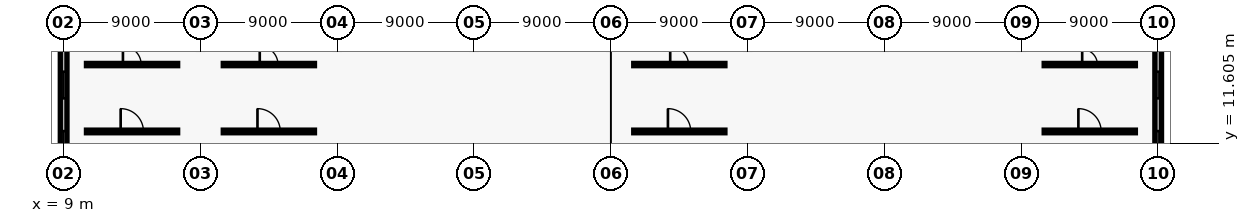
"""IFC4 building model, lengths in metres.
Left out: names, types, materials, properties, quantities, classifications, styles, units other than length and angle.
Written with IfcOpenShell. Run it as: python <this file> out.ifc"""

import sys

from ifc_helpers import new_model, si_unit, direction, frame, frame_2d, origin, place, context, subcontext, project, spatial, rectangle, extrude, element, fill, save


model = new_model("IFC4")
c1 = context("Model", 3, precision=1e-05, world=origin(), true_north=direction((0.0, 1.0)))
c2 = subcontext(c1, "Body", "Model", "MODEL_VIEW")
j1 = project(units=[si_unit("LENGTHUNIT", "METRE"), si_unit("PLANEANGLEUNIT", "RADIAN")], contexts=[c1])
p1 = place(None, origin())
s1 = spatial("IfcSite", under=j1, at=p1, CompositionType="ELEMENT")
p2 = place(p1, origin())
s2 = spatial("IfcBuilding", under=s1, at=p2, CompositionType="ELEMENT")
p3 = place(p2, frame((0.0, 0.0, 5.4)))
s3 = spatial("IfcBuildingStorey", under=s2, at=p3, CompositionType="ELEMENT", Elevation=5.4)
p4 = place(p3, frame((9.0, 9.06, 0.0), z_axis=(0.0, 0.0, 1.0), x_axis=(0.0, 1.0, 0.0)))
e1 = element("IfcWall", 1, at=p4, inside=s3, PredefinedType="SOLIDWALL", context=c2, shape_type="SweptSolid", body=[
    extrude(rectangle(XDim=8.88, YDim=0.44, at=frame_2d((4.44, 0.0))), origin(), (0.0, 0.0, 1.0), 3.5),
])
p5 = place(p4, frame((1.611, 0.0, 0.9)))
e2 = element("IfcOpeningElement", 2, at=p5, cuts=e1, PredefinedType="OPENING", context=c2, shape_type="SweptSolid", body=[
    extrude(rectangle(XDim=1.75, YDim=2.25, at=frame_2d((0.875, 1.125))), frame((0.0, 0.23, 0.0), z_axis=(0.0, -1.0, 0.0), x_axis=(1.0, 0.0, 0.0)), (0.0, 0.0, 1.0), 0.46),
])
p6 = place(p4, frame((5.519, 0.0, 0.9)))
e3 = element("IfcOpeningElement", 3, at=p6, cuts=e1, PredefinedType="OPENING", context=c2, shape_type="SweptSolid", body=[
    extrude(rectangle(XDim=1.75, YDim=2.25, at=frame_2d((0.875, 1.125))), frame((0.0, 0.23, 0.0), z_axis=(0.0, -1.0, 0.0), x_axis=(1.0, 0.0, 0.0)), (0.0, 0.0, 1.0), 0.46),
])
p7 = place(p3, frame((81.0, 9.06, 0.0), z_axis=(0.0, 0.0, 1.0), x_axis=(0.0, 1.0, 0.0)))
e4 = element("IfcWall", 4, at=p7, inside=s3, PredefinedType="SOLIDWALL", context=c2, shape_type="SweptSolid", body=[
    extrude(rectangle(XDim=8.88, YDim=0.44, at=frame_2d((4.44, 0.0))), origin(), (0.0, 0.0, 1.0), 3.5),
])
p8 = place(p7, frame((1.611, 0.0, 0.9)))
e5 = element("IfcOpeningElement", 5, at=p8, cuts=e4, PredefinedType="OPENING", context=c2, shape_type="SweptSolid", body=[
    extrude(rectangle(XDim=1.75, YDim=2.25, at=frame_2d((0.875, 1.125))), frame((0.0, 0.23, 0.0), z_axis=(0.0, -1.0, 0.0), x_axis=(1.0, 0.0, 0.0)), (0.0, 0.0, 1.0), 0.46),
])
p9 = place(p7, frame((5.519, 0.0, 0.9)))
e6 = element("IfcOpeningElement", 6, at=p9, cuts=e4, PredefinedType="OPENING", context=c2, shape_type="SweptSolid", body=[
    extrude(rectangle(XDim=1.75, YDim=2.25, at=frame_2d((0.875, 1.125))), frame((0.0, 0.23, 0.0), z_axis=(0.0, -1.0, 0.0), x_axis=(1.0, 0.0, 0.0)), (0.0, 0.0, 1.0), 0.46),
])
p10 = place(p3, frame((10.5, 12.4, 0.0), z_axis=(0.0, 0.0, 1.0), x_axis=(1.0, 0.0, 0.0)))
e7 = element("IfcWall", 7, at=p10, inside=s3, PredefinedType="PARTITIONING", context=c2, shape_type="SweptSolid", body=[
    extrude(rectangle(XDim=6.0, YDim=0.175, at=frame_2d((3.0, 0.0))), origin(), (0.0, 0.0, 1.0), 3.2),
])
p11 = place(p10, frame((2.25, 0.0, 0.0)))
e8 = element("IfcOpeningElement", 8, at=p11, cuts=e7, PredefinedType="OPENING", context=c2, shape_type="SweptSolid", body=[
    extrude(rectangle(XDim=1.5, YDim=2.2, at=frame_2d((0.75, 1.1))), frame((0.0, 0.097, 0.0), z_axis=(0.0, -1.0, 0.0), x_axis=(1.0, 0.0, 0.0)), (0.0, 0.0, 1.0), 0.195),
])
p12 = place(p3, frame((10.5, 16.8, 0.0), z_axis=(0.0, 0.0, 1.0), x_axis=(1.0, 0.0, 0.0)))
e9 = element("IfcWall", 9, at=p12, inside=s3, PredefinedType="PARTITIONING", context=c2, shape_type="SweptSolid", body=[
    extrude(rectangle(XDim=6.0, YDim=0.15, at=frame_2d((3.0, 0.0))), origin(), (0.0, 0.0, 1.0), 3.2),
])
p13 = place(p12, frame((2.4, 0.0, 0.0)))
e10 = element("IfcOpeningElement", 10, at=p13, cuts=e9, PredefinedType="OPENING", context=c2, shape_type="SweptSolid", body=[
    extrude(rectangle(XDim=1.2, YDim=2.2, at=frame_2d((0.6, 1.1))), frame((0.0, 0.085, 0.0), z_axis=(0.0, -1.0, 0.0), x_axis=(1.0, 0.0, 0.0)), (0.0, 0.0, 1.0), 0.17),
])
p14 = place(p3, frame((19.5, 12.4, 0.0), z_axis=(0.0, 0.0, 1.0), x_axis=(1.0, 0.0, 0.0)))
e11 = element("IfcWall", 11, at=p14, inside=s3, PredefinedType="PARTITIONING", context=c2, shape_type="SweptSolid", body=[
    extrude(rectangle(XDim=6.0, YDim=0.175, at=frame_2d((3.0, 0.0))), origin(), (0.0, 0.0, 1.0), 3.2),
])
p15 = place(p14, frame((2.25, 0.0, 0.0)))
e12 = element("IfcOpeningElement", 12, at=p15, cuts=e11, PredefinedType="OPENING", context=c2, shape_type="SweptSolid", body=[
    extrude(rectangle(XDim=1.5, YDim=2.2, at=frame_2d((0.75, 1.1))), frame((0.0, 0.097, 0.0), z_axis=(0.0, -1.0, 0.0), x_axis=(1.0, 0.0, 0.0)), (0.0, 0.0, 1.0), 0.195),
])
p16 = place(p3, frame((19.5, 16.8, 0.0), z_axis=(0.0, 0.0, 1.0), x_axis=(1.0, 0.0, 0.0)))
e13 = element("IfcWall", 13, at=p16, inside=s3, PredefinedType="PARTITIONING", context=c2, shape_type="SweptSolid", body=[
    extrude(rectangle(XDim=6.0, YDim=0.15, at=frame_2d((3.0, 0.0))), origin(), (0.0, 0.0, 1.0), 3.2),
])
p17 = place(p16, frame((2.4, 0.0, 0.0)))
e14 = element("IfcOpeningElement", 14, at=p17, cuts=e13, PredefinedType="OPENING", context=c2, shape_type="SweptSolid", body=[
    extrude(rectangle(XDim=1.2, YDim=2.2, at=frame_2d((0.6, 1.1))), frame((0.0, 0.085, 0.0), z_axis=(0.0, -1.0, 0.0), x_axis=(1.0, 0.0, 0.0)), (0.0, 0.0, 1.0), 0.17),
])
p18 = place(p3, frame((46.5, 12.4, 0.0), z_axis=(0.0, 0.0, 1.0), x_axis=(1.0, 0.0, 0.0)))
e15 = element("IfcWall", 15, at=p18, inside=s3, PredefinedType="PARTITIONING", context=c2, shape_type="SweptSolid", body=[
    extrude(rectangle(XDim=6.0, YDim=0.175, at=frame_2d((3.0, 0.0))), origin(), (0.0, 0.0, 1.0), 3.2),
])
p19 = place(p18, frame((2.25, 0.0, 0.0)))
e16 = element("IfcOpeningElement", 16, at=p19, cuts=e15, PredefinedType="OPENING", context=c2, shape_type="SweptSolid", body=[
    extrude(rectangle(XDim=1.5, YDim=2.2, at=frame_2d((0.75, 1.1))), frame((0.0, 0.097, 0.0), z_axis=(0.0, -1.0, 0.0), x_axis=(1.0, 0.0, 0.0)), (0.0, 0.0, 1.0), 0.195),
])
p20 = place(p3, frame((46.5, 16.8, 0.0), z_axis=(0.0, 0.0, 1.0), x_axis=(1.0, 0.0, 0.0)))
e17 = element("IfcWall", 17, at=p20, inside=s3, PredefinedType="PARTITIONING", context=c2, shape_type="SweptSolid", body=[
    extrude(rectangle(XDim=6.0, YDim=0.15, at=frame_2d((3.0, 0.0))), origin(), (0.0, 0.0, 1.0), 3.2),
])
p21 = place(p20, frame((2.4, 0.0, 0.0)))
e18 = element("IfcOpeningElement", 18, at=p21, cuts=e17, PredefinedType="OPENING", context=c2, shape_type="SweptSolid", body=[
    extrude(rectangle(XDim=1.2, YDim=2.2, at=frame_2d((0.6, 1.1))), frame((0.0, 0.085, 0.0), z_axis=(0.0, -1.0, 0.0), x_axis=(1.0, 0.0, 0.0)), (0.0, 0.0, 1.0), 0.17),
])
p22 = place(p3, frame((73.5, 12.4, 0.0), z_axis=(0.0, 0.0, 1.0), x_axis=(1.0, 0.0, 0.0)))
e19 = element("IfcWall", 19, at=p22, inside=s3, PredefinedType="PARTITIONING", context=c2, shape_type="SweptSolid", body=[
    extrude(rectangle(XDim=6.0, YDim=0.175, at=frame_2d((3.0, 0.0))), origin(), (0.0, 0.0, 1.0), 3.2),
])
p23 = place(p22, frame((2.25, 0.0, 0.0)))
e20 = element("IfcOpeningElement", 20, at=p23, cuts=e19, PredefinedType="OPENING", context=c2, shape_type="SweptSolid", body=[
    extrude(rectangle(XDim=1.5, YDim=2.2, at=frame_2d((0.75, 1.1))), frame((0.0, 0.097, 0.0), z_axis=(0.0, -1.0, 0.0), x_axis=(1.0, 0.0, 0.0)), (0.0, 0.0, 1.0), 0.195),
])
p24 = place(p3, frame((73.5, 16.8, 0.0), z_axis=(0.0, 0.0, 1.0), x_axis=(1.0, 0.0, 0.0)))
e21 = element("IfcWall", 21, at=p24, inside=s3, PredefinedType="PARTITIONING", context=c2, shape_type="SweptSolid", body=[
    extrude(rectangle(XDim=6.0, YDim=0.15, at=frame_2d((3.0, 0.0))), origin(), (0.0, 0.0, 1.0), 3.2),
])
p25 = place(p24, frame((2.5, 0.0, 0.0)))
e22 = element("IfcOpeningElement", 22, at=p25, cuts=e21, PredefinedType="OPENING", context=c2, shape_type="SweptSolid", body=[
    extrude(rectangle(XDim=1.0, YDim=2.1, at=frame_2d((0.5, 1.05))), frame((0.0, 0.085, 0.0), z_axis=(0.0, -1.0, 0.0), x_axis=(1.0, 0.0, 0.0)), (0.0, 0.0, 1.0), 0.17),
])
p26 = place(p5, origin())
e23 = element("IfcWindow", 23, at=p26, inside=s3, PartitioningType="SINGLE_PANEL", PredefinedType="WINDOW", context=c2, shape_type="SweptSolid", body=[
    extrude(rectangle(XDim=1.75, YDim=2.25, at=frame_2d((0.875, 1.125))), frame((0.0, 0.03, 0.0), z_axis=(0.0, -1.0, 0.0), x_axis=(1.0, 0.0, 0.0)), (0.0, 0.0, 1.0), 0.06),
])
fill(e2, e23)
p27 = place(p6, origin())
e24 = element("IfcWindow", 24, at=p27, inside=s3, PartitioningType="SINGLE_PANEL", PredefinedType="WINDOW", context=c2, shape_type="SweptSolid", body=[
    extrude(rectangle(XDim=1.75, YDim=2.25, at=frame_2d((0.875, 1.125))), frame((0.0, 0.03, 0.0), z_axis=(0.0, -1.0, 0.0), x_axis=(1.0, 0.0, 0.0)), (0.0, 0.0, 1.0), 0.06),
])
fill(e3, e24)
p28 = place(p8, origin())
e25 = element("IfcWindow", 25, at=p28, inside=s3, PartitioningType="SINGLE_PANEL", PredefinedType="WINDOW", context=c2, shape_type="SweptSolid", body=[
    extrude(rectangle(XDim=1.75, YDim=2.25, at=frame_2d((0.875, 1.125))), frame((0.0, 0.03, 0.0), z_axis=(0.0, -1.0, 0.0), x_axis=(1.0, 0.0, 0.0)), (0.0, 0.0, 1.0), 0.06),
])
fill(e5, e25)
p29 = place(p9, origin())
e26 = element("IfcWindow", 26, at=p29, inside=s3, PartitioningType="SINGLE_PANEL", PredefinedType="WINDOW", context=c2, shape_type="SweptSolid", body=[
    extrude(rectangle(XDim=1.75, YDim=2.25, at=frame_2d((0.875, 1.125))), frame((0.0, 0.03, 0.0), z_axis=(0.0, -1.0, 0.0), x_axis=(1.0, 0.0, 0.0)), (0.0, 0.0, 1.0), 0.06),
])
fill(e6, e26)
p30 = place(p11, origin())
e27 = element("IfcDoor", 27, at=p30, inside=s3, OperationType="DOUBLE_DOOR_SINGLE_SWING", PredefinedType="DOOR", context=c2, shape_type="SweptSolid", body=[
    extrude(rectangle(XDim=1.5, YDim=2.2, at=frame_2d((0.75, 1.1))), frame((0.0, 0.025, 0.0), z_axis=(0.0, -1.0, 0.0), x_axis=(1.0, 0.0, 0.0)), (0.0, 0.0, 1.0), 0.05),
])
fill(e8, e27)
p31 = place(p13, origin())
e28 = element("IfcDoor", 28, at=p31, inside=s3, OperationType="SINGLE_SWING_LEFT", PredefinedType="DOOR", context=c2, shape_type="SweptSolid", body=[
    extrude(rectangle(XDim=1.2, YDim=2.2, at=frame_2d((0.6, 1.1))), frame((0.0, 0.025, 0.0), z_axis=(0.0, -1.0, 0.0), x_axis=(1.0, 0.0, 0.0)), (0.0, 0.0, 1.0), 0.05),
])
fill(e10, e28)
p32 = place(p15, origin())
e29 = element("IfcDoor", 29, at=p32, inside=s3, OperationType="DOUBLE_DOOR_SINGLE_SWING", PredefinedType="DOOR", context=c2, shape_type="SweptSolid", body=[
    extrude(rectangle(XDim=1.5, YDim=2.2, at=frame_2d((0.75, 1.1))), frame((0.0, 0.025, 0.0), z_axis=(0.0, -1.0, 0.0), x_axis=(1.0, 0.0, 0.0)), (0.0, 0.0, 1.0), 0.05),
])
fill(e12, e29)
p33 = place(p17, origin())
e30 = element("IfcDoor", 30, at=p33, inside=s3, OperationType="SINGLE_SWING_LEFT", PredefinedType="DOOR", context=c2, shape_type="SweptSolid", body=[
    extrude(rectangle(XDim=1.2, YDim=2.2, at=frame_2d((0.6, 1.1))), frame((0.0, 0.025, 0.0), z_axis=(0.0, -1.0, 0.0), x_axis=(1.0, 0.0, 0.0)), (0.0, 0.0, 1.0), 0.05),
])
fill(e14, e30)
p34 = place(p19, origin())
e31 = element("IfcDoor", 31, at=p34, inside=s3, OperationType="DOUBLE_DOOR_SINGLE_SWING", PredefinedType="DOOR", context=c2, shape_type="SweptSolid", body=[
    extrude(rectangle(XDim=1.5, YDim=2.2, at=frame_2d((0.75, 1.1))), frame((0.0, 0.025, 0.0), z_axis=(0.0, -1.0, 0.0), x_axis=(1.0, 0.0, 0.0)), (0.0, 0.0, 1.0), 0.05),
])
fill(e16, e31)
p35 = place(p21, origin())
e32 = element("IfcDoor", 32, at=p35, inside=s3, OperationType="SINGLE_SWING_LEFT", PredefinedType="DOOR", context=c2, shape_type="SweptSolid", body=[
    extrude(rectangle(XDim=1.2, YDim=2.2, at=frame_2d((0.6, 1.1))), frame((0.0, 0.025, 0.0), z_axis=(0.0, -1.0, 0.0), x_axis=(1.0, 0.0, 0.0)), (0.0, 0.0, 1.0), 0.05),
])
fill(e18, e32)
p36 = place(p23, origin())
e33 = element("IfcDoor", 33, at=p36, inside=s3, OperationType="DOUBLE_DOOR_SINGLE_SWING", PredefinedType="DOOR", context=c2, shape_type="SweptSolid", body=[
    extrude(rectangle(XDim=1.5, YDim=2.2, at=frame_2d((0.75, 1.1))), frame((0.0, 0.025, 0.0), z_axis=(0.0, -1.0, 0.0), x_axis=(1.0, 0.0, 0.0)), (0.0, 0.0, 1.0), 0.05),
])
fill(e20, e33)
p37 = place(p25, origin())
e34 = element("IfcDoor", 34, at=p37, inside=s3, OperationType="SINGLE_SWING_LEFT", PredefinedType="DOOR", context=c2, shape_type="SweptSolid", body=[
    extrude(rectangle(XDim=1.0, YDim=2.1, at=frame_2d((0.5, 1.05))), frame((0.0, 0.025, 0.0), z_axis=(0.0, -1.0, 0.0), x_axis=(1.0, 0.0, 0.0)), (0.0, 0.0, 1.0), 0.05),
])
fill(e22, e34)
save(model, sys.argv[1])
